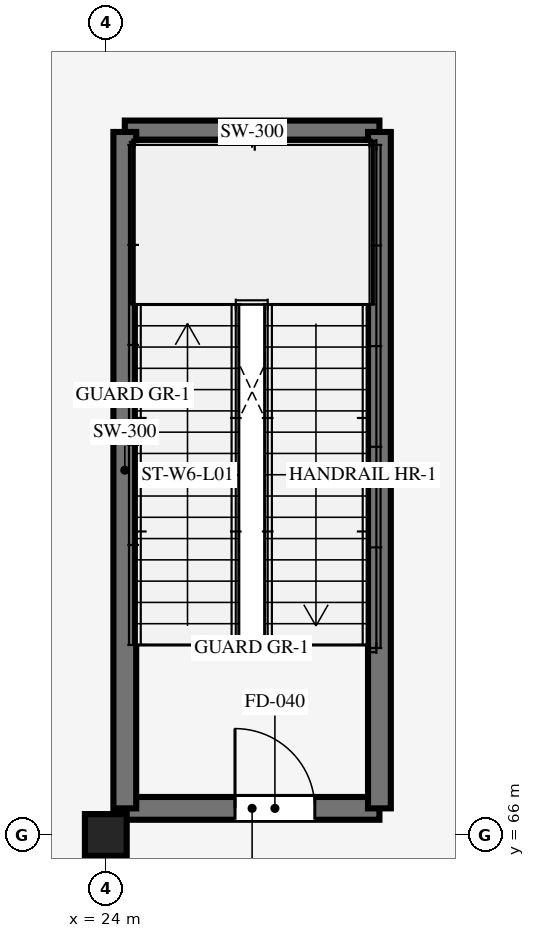
"""IFC4 building model, lengths in metres.
Left out: names, types, materials, properties, quantities, classifications, styles, units other than length and angle.
Written with IfcOpenShell. Run it as: python <this file> out.ifc"""

import sys

from ifc_helpers import new_model, si_unit, direction, frame, frame_2d, origin, origin_2d, place, context, subcontext, project, spatial, rectangle, extrude, element, fill, save


model = new_model("IFC4")
c1 = context("Model", 3, precision=1e-05, world=origin(), true_north=direction((0.0, 1.0)))
c2 = subcontext(c1, "Body", "Model", "MODEL_VIEW")
j1 = project(units=[si_unit("LENGTHUNIT", "METRE"), si_unit("PLANEANGLEUNIT", "RADIAN")], contexts=[c1])
p1 = place(None, origin())
s1 = spatial("IfcSite", under=j1, at=p1, CompositionType="ELEMENT")
p2 = place(p1, origin())
s2 = spatial("IfcBuilding", under=s1, at=p2, CompositionType="ELEMENT")
p3 = place(p2, frame((0.0, 0.0, 5.4)))
s3 = spatial("IfcBuildingStorey", under=s2, at=p3, CompositionType="ELEMENT", Elevation=5.4)
p4 = place(p3, frame((24.0, 66.0, 0.0), z_axis=(0.0, 0.0, 1.0), x_axis=(1.0, 0.0, 0.0)))
e1 = element("IfcColumn", 1, at=p4, inside=s3, PredefinedType="COLUMN", context=c2, shape_type="SweptSolid", body=[
    extrude(rectangle(XDim=0.55, YDim=0.55, at=origin_2d()), origin(), (0.0, 0.0, 1.0), 4.64),
])
p5 = place(p3, frame((24.25, 66.35, 0.0), z_axis=(0.0, 0.0, 1.0), x_axis=(1.0, 0.0, 0.0)))
e2 = element("IfcWall", 2, at=p5, inside=s3, PredefinedType="SHEAR", context=c2, shape_type="SweptSolid", body=[
    extrude(rectangle(XDim=3.35, YDim=0.3, at=frame_2d((1.675, 0.0))), origin(), (0.0, 0.0, 1.0), 4.78),
])
p6 = place(p5, frame((1.45, 0.0, 0.0)))
e3 = element("IfcOpeningElement", 3, at=p6, cuts=e2, PredefinedType="OPENING", context=c2, shape_type="SweptSolid", body=[
    extrude(rectangle(XDim=1.05, YDim=2.15, at=frame_2d((0.525, 1.075))), frame((0.0, 0.16, 0.0), z_axis=(0.0, -1.0, 0.0), x_axis=(1.0, 0.0, 0.0)), (0.0, 0.0, 1.0), 0.32),
])
p7 = place(p3, frame((24.25, 75.25, 0.0), z_axis=(0.0, 0.0, 1.0), x_axis=(1.0, 0.0, 0.0)))
e4 = element("IfcWall", 4, at=p7, inside=s3, PredefinedType="SHEAR", context=c2, shape_type="SweptSolid", body=[
    extrude(rectangle(XDim=3.35, YDim=0.3, at=frame_2d((1.675, 0.0))), origin(), (0.0, 0.0, 1.0), 4.78),
])
for number, where, z_axis, x_axis in (
    (5, (24.25, 66.35, 0.0), (0.0, 0.0, 1.0), (0.0, 1.0, 0.0)),
    (6, (27.6, 66.35, 0.0), (0.0, 0.0, 1.0), (0.0, 1.0, 0.0)),
):
    element("IfcWall", number, at=place(p3, frame(where, z_axis=z_axis, x_axis=x_axis)), inside=s3, PredefinedType="SHEAR", context=c2, shape_type="SweptSolid", body=[
        extrude(rectangle(XDim=8.9, YDim=0.3, at=frame_2d((4.45, 0.0))), origin(), (0.0, 0.0, 1.0), 4.78),
    ])
p8 = place(p6, origin())
e7 = element("IfcDoor", 7, at=p8, inside=s3, OperationType="SINGLE_SWING_LEFT", PredefinedType="DOOR", context=c2, shape_type="SweptSolid", body=[
    extrude(rectangle(XDim=1.05, YDim=2.15, at=frame_2d((0.525, 1.075))), frame((0.0, 0.025, 0.0), z_axis=(0.0, -1.0, 0.0), x_axis=(1.0, 0.0, 0.0)), (0.0, 0.0, 1.0), 0.05),
])
fill(e3, e7)
save(model, sys.argv[1])
